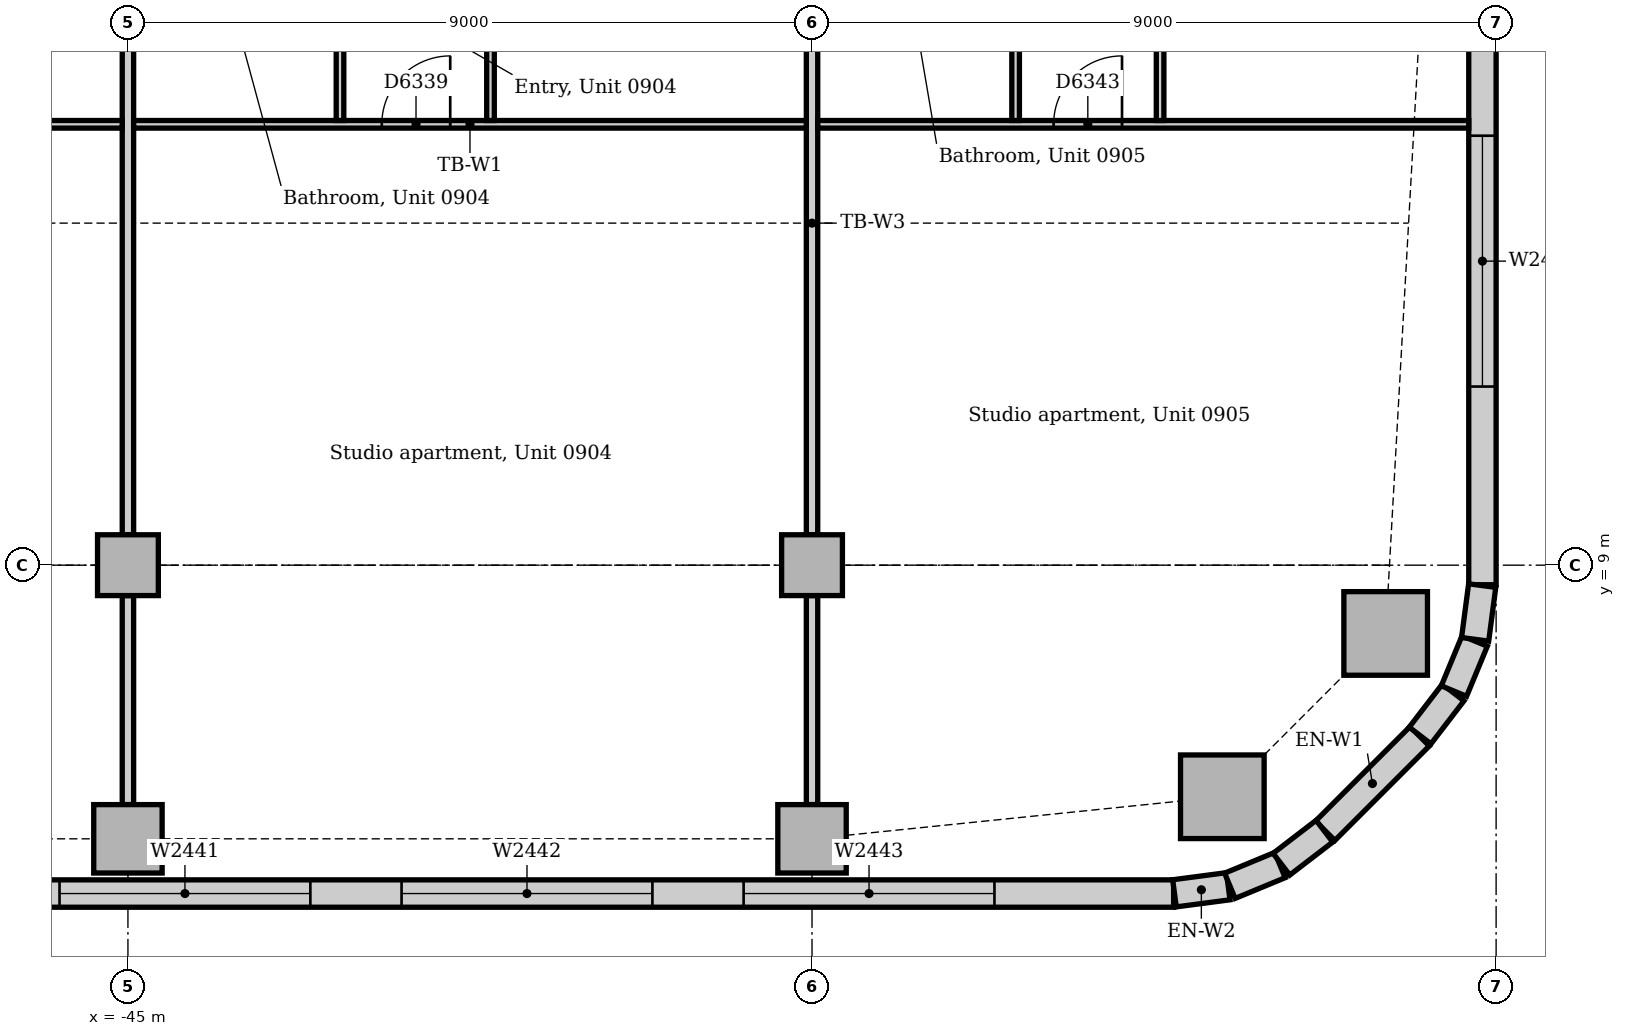
"""IFC4 building model, lengths in metres.
Left out: names, types, materials, properties, quantities, classifications, styles, units other than length and angle.
Written with IfcOpenShell. Run it as: python <this file> out.ifc"""

import sys

from ifc_helpers import new_model, si_unit, direction, frame, frame_2d, origin, origin_2d, place, context, subcontext, project, spatial, rectangle, extrude, element, fill, save


model = new_model("IFC4")
c1 = context("Model", 3, precision=1e-05, world=origin(), true_north=direction((0.0, 1.0)))
c2 = subcontext(c1, "Body", "Model", "MODEL_VIEW")
j1 = project(units=[si_unit("LENGTHUNIT", "METRE"), si_unit("PLANEANGLEUNIT", "RADIAN")], contexts=[c1])
p1 = place(None, origin())
s1 = spatial("IfcSite", under=j1, at=p1, CompositionType="ELEMENT")
p2 = place(p1, origin())
s2 = spatial("IfcBuilding", under=s1, at=p2, CompositionType="ELEMENT")
p3 = place(p2, frame((0.0, 0.0, 42.0)))
s3 = spatial("IfcBuildingStorey", under=s2, at=p3, CompositionType="ELEMENT", Elevation=42.0)
for number, where, z_axis, x_axis in (
    (1, (-30.602, 5.953, 0.0), (0.0, 0.0, 1.0), (1.0, 0.0, 0.0)),
    (2, (-28.453, 8.102, 0.0), (0.0, 0.0, 1.0), (1.0, 0.0, 0.0)),
):
    element("IfcColumn", number, at=place(p3, frame(where, z_axis=z_axis, x_axis=x_axis)), inside=s3, PredefinedType="COLUMN", context=c2, shape_type="SweptSolid", body=[
        extrude(rectangle(XDim=1.1, YDim=1.1, at=origin_2d()), origin(), (0.0, 0.0, 1.0), 3.7),
    ])
for number, where, z_axis, x_axis in (
    (3, (-45.0, 5.4, 0.0), (0.0, 0.0, 1.0), (1.0, 0.0, 0.0)),
    (4, (-36.0, 5.4, 0.0), (0.0, 0.0, 1.0), (1.0, 0.0, 0.0)),
):
    element("IfcColumn", number, at=place(p3, frame(where, z_axis=z_axis, x_axis=x_axis)), inside=s3, PredefinedType="COLUMN", context=c2, shape_type="SweptSolid", body=[
        extrude(rectangle(XDim=0.9, YDim=0.9, at=origin_2d()), origin(), (0.0, 0.0, 1.0), 3.7),
    ])
for number, where, z_axis, x_axis in (
    (5, (-45.0, 9.0, 0.0), (0.0, 0.0, 1.0), (1.0, 0.0, 0.0)),
    (6, (-36.0, 9.0, 0.0), (0.0, 0.0, 1.0), (1.0, 0.0, 0.0)),
):
    element("IfcColumn", number, at=place(p3, frame(where, z_axis=z_axis, x_axis=x_axis)), inside=s3, PredefinedType="COLUMN", context=c2, shape_type="SweptSolid", body=[
        extrude(rectangle(XDim=0.8, YDim=0.8, at=origin_2d()), origin(), (0.0, 0.0, 1.0), 3.7),
    ])
p4 = place(p3, frame((-61.757, 4.68, 0.0), z_axis=(0.0, 0.0, 1.0), x_axis=(1.0, 0.0, 0.0)))
e7 = element("IfcWall", 7, at=p4, inside=s3, PredefinedType="STANDARD", context=c2, shape_type="SweptSolid", body=[
    extrude(rectangle(XDim=30.515, YDim=0.36, at=frame_2d((15.257, 0.0))), origin(), (0.0, 0.0, 1.0), 3.7),
])
p5 = place(p4, frame((2.357, 0.0, 0.9)))
e8 = element("IfcOpeningElement", 8, at=p5, cuts=e7, PredefinedType="OPENING", context=c2, shape_type="SweptSolid", body=[
    extrude(rectangle(XDim=3.3, YDim=1.6, at=frame_2d((1.65, 0.8))), frame((0.0, 0.19, 0.0), z_axis=(0.0, -1.0, 0.0), x_axis=(1.0, 0.0, 0.0)), (0.0, 0.0, 1.0), 0.38),
])
p6 = place(p4, frame((6.857, 0.0, 0.9)))
e9 = element("IfcOpeningElement", 9, at=p6, cuts=e7, PredefinedType="OPENING", context=c2, shape_type="SweptSolid", body=[
    extrude(rectangle(XDim=3.3, YDim=1.6, at=frame_2d((1.65, 0.8))), frame((0.0, 0.19, 0.0), z_axis=(0.0, -1.0, 0.0), x_axis=(1.0, 0.0, 0.0)), (0.0, 0.0, 1.0), 0.38),
])
p7 = place(p4, frame((11.357, 0.0, 0.9)))
e10 = element("IfcOpeningElement", 10, at=p7, cuts=e7, PredefinedType="OPENING", context=c2, shape_type="SweptSolid", body=[
    extrude(rectangle(XDim=3.3, YDim=1.6, at=frame_2d((1.65, 0.8))), frame((0.0, 0.19, 0.0), z_axis=(0.0, -1.0, 0.0), x_axis=(1.0, 0.0, 0.0)), (0.0, 0.0, 1.0), 0.38),
])
p8 = place(p4, frame((15.857, 0.0, 0.9)))
e11 = element("IfcOpeningElement", 11, at=p8, cuts=e7, PredefinedType="OPENING", context=c2, shape_type="SweptSolid", body=[
    extrude(rectangle(XDim=3.3, YDim=1.6, at=frame_2d((1.65, 0.8))), frame((0.0, 0.19, 0.0), z_axis=(0.0, -1.0, 0.0), x_axis=(1.0, 0.0, 0.0)), (0.0, 0.0, 1.0), 0.38),
])
p9 = place(p4, frame((20.357, 0.0, 0.9)))
e12 = element("IfcOpeningElement", 12, at=p9, cuts=e7, PredefinedType="OPENING", context=c2, shape_type="SweptSolid", body=[
    extrude(rectangle(XDim=3.3, YDim=1.6, at=frame_2d((1.65, 0.8))), frame((0.0, 0.19, 0.0), z_axis=(0.0, -1.0, 0.0), x_axis=(1.0, 0.0, 0.0)), (0.0, 0.0, 1.0), 0.38),
])
p10 = place(p4, frame((24.857, 0.0, 0.9)))
e13 = element("IfcOpeningElement", 13, at=p10, cuts=e7, PredefinedType="OPENING", context=c2, shape_type="SweptSolid", body=[
    extrude(rectangle(XDim=3.3, YDim=1.6, at=frame_2d((1.65, 0.8))), frame((0.0, 0.19, 0.0), z_axis=(0.0, -1.0, 0.0), x_axis=(1.0, 0.0, 0.0)), (0.0, 0.0, 1.0), 0.38),
])
p11 = place(p3, frame((-29.249, 5.506, 0.0), z_axis=(0.0, 0.0, 1.0), x_axis=(0.707106781187, 0.707106781187, 0.0)))
e14 = element("IfcWall", 14, at=p11, inside=s3, PredefinedType="STANDARD", context=c2, shape_type="SweptSolid", body=[
    extrude(rectangle(XDim=1.757, YDim=0.36, at=frame_2d((0.879, 0.0))), origin(), (0.0, 0.0, 1.0), 3.7),
])
p12 = place(p3, frame((-27.18, 8.743, 0.0), z_axis=(0.0, 0.0, 1.0), x_axis=(0.0, 1.0, 0.0)))
e15 = element("IfcWall", 15, at=p12, inside=s3, PredefinedType="STANDARD", context=c2, shape_type="SweptSolid", body=[
    extrude(rectangle(XDim=12.257, YDim=0.36, at=frame_2d((6.129, 0.0))), origin(), (0.0, 0.0, 1.0), 3.7),
])
p13 = place(p12, frame((2.607, 0.0, 0.9)))
e16 = element("IfcOpeningElement", 16, at=p13, cuts=e15, PredefinedType="OPENING", context=c2, shape_type="SweptSolid", body=[
    extrude(rectangle(XDim=3.3, YDim=1.6, at=frame_2d((1.65, 0.8))), frame((0.0, 0.19, 0.0), z_axis=(0.0, -1.0, 0.0), x_axis=(1.0, 0.0, 0.0)), (0.0, 0.0, 1.0), 0.38),
])
p14 = place(p12, frame((7.607, 0.0, 0.9)))
e17 = element("IfcOpeningElement", 17, at=p14, cuts=e15, PredefinedType="OPENING", context=c2, shape_type="SweptSolid", body=[
    extrude(rectangle(XDim=3.3, YDim=1.6, at=frame_2d((1.65, 0.8))), frame((0.0, 0.19, 0.0), z_axis=(0.0, -1.0, 0.0), x_axis=(1.0, 0.0, 0.0)), (0.0, 0.0, 1.0), 0.38),
])
for number, where, z_axis, x_axis in (
    (18, (-31.231, 4.683, 0.0), (0.0, 0.0, 1.0), (0.991, 0.131, 0.0)),
    (19, (-30.503, 4.782, 0.0), (0.0, 0.0, 1.0), (0.924, 0.383, 0.0)),
):
    element("IfcWall", number, at=place(p3, frame(where, z_axis=z_axis, x_axis=x_axis)), inside=s3, PredefinedType="STANDARD", context=c2, shape_type="SweptSolid", body=[
        extrude(rectangle(XDim=0.713, YDim=0.36, at=frame_2d((0.356, 0.0))), origin(), (0.0, 0.0, 1.0), 3.7),
    ])
for number, where, z_axis, x_axis in (
    (20, (-29.825, 5.066, 0.0), (0.0, 0.0, 1.0), (0.793, 0.609, 0.0)),
    (21, (-28.0, 6.759, 0.0), (0.0, 0.0, 1.0), (0.609, 0.793, 0.0)),
):
    element("IfcWall", number, at=place(p3, frame(where, z_axis=z_axis, x_axis=x_axis)), inside=s3, PredefinedType="STANDARD", context=c2, shape_type="SweptSolid", body=[
        extrude(rectangle(XDim=0.713, YDim=0.36, at=frame_2d((0.357, 0.0))), origin(), (0.0, 0.0, 1.0), 3.7),
    ])
for number, where, z_axis, x_axis in (
    (22, (-27.555, 7.344, 0.0), (0.0, 0.0, 1.0), (0.383, 0.924, 0.0)),
    (23, (-27.276, 8.024, 0.0), (0.0, 0.0, 1.0), (0.131, 0.991, 0.0)),
):
    element("IfcWall", number, at=place(p3, frame(where, z_axis=z_axis, x_axis=x_axis)), inside=s3, PredefinedType="STANDARD", context=c2, shape_type="SweptSolid", body=[
        extrude(rectangle(XDim=0.713, YDim=0.36, at=frame_2d((0.356, 0.0))), origin(), (0.0, 0.0, 1.0), 3.7),
    ])
p15 = place(p3, frame((-45.0, 9.4, 0.0), z_axis=(0.0, 0.0, 1.0), x_axis=(0.0, 1.0, 0.0)))
e24 = element("IfcWall", 24, at=p15, inside=s3, PredefinedType="PARTITIONING", context=c2, shape_type="SweptSolid", body=[
    extrude(rectangle(XDim=8.2, YDim=0.15, at=frame_2d((4.1, 0.0))), origin(), (0.0, 0.0, 1.0), 3.008),
])
p16 = place(p3, frame((-45.0, 5.85, 0.0), z_axis=(0.0, 0.0, 1.0), x_axis=(0.0, 1.0, 0.0)))
e25 = element("IfcWall", 25, at=p16, inside=s3, PredefinedType="PARTITIONING", context=c2, shape_type="SweptSolid", body=[
    extrude(rectangle(XDim=2.75, YDim=0.15, at=frame_2d((1.375, 0.0))), origin(), (0.0, 0.0, 1.0), 3.502),
])
p17 = place(p3, frame((-36.0, 9.4, 0.0), z_axis=(0.0, 0.0, 1.0), x_axis=(0.0, 1.0, 0.0)))
e26 = element("IfcWall", 26, at=p17, inside=s3, PredefinedType="PARTITIONING", context=c2, shape_type="SweptSolid", body=[
    extrude(rectangle(XDim=8.2, YDim=0.15, at=frame_2d((4.1, 0.0))), origin(), (0.0, 0.0, 1.0), 3.008),
])
p18 = place(p3, frame((-36.0, 5.85, 0.0), z_axis=(0.0, 0.0, 1.0), x_axis=(0.0, 1.0, 0.0)))
e27 = element("IfcWall", 27, at=p18, inside=s3, PredefinedType="PARTITIONING", context=c2, shape_type="SweptSolid", body=[
    extrude(rectangle(XDim=2.75, YDim=0.15, at=frame_2d((1.375, 0.0))), origin(), (0.0, 0.0, 1.0), 3.502),
])
p19 = place(p3, frame((-53.925, 14.8, 0.0), z_axis=(0.0, 0.0, 1.0), x_axis=(1.0, 0.0, 0.0)))
e28 = element("IfcWall", 28, at=p19, inside=s3, PredefinedType="PARTITIONING", context=c2, shape_type="SweptSolid", body=[
    extrude(rectangle(XDim=8.85, YDim=0.1, at=frame_2d((4.425, 0.0))), origin(), (0.0, 0.0, 1.0), 3.7),
])
p20 = place(p19, frame((3.265, 0.0, 0.0)))
e29 = element("IfcOpeningElement", 29, at=p20, cuts=e28, PredefinedType="OPENING", context=c2, shape_type="SweptSolid", body=[
    extrude(rectangle(XDim=0.9, YDim=2.1, at=frame_2d((0.45, 1.05))), frame((0.0, 0.06, 0.0), z_axis=(0.0, -1.0, 0.0), x_axis=(1.0, 0.0, 0.0)), (0.0, 0.0, 1.0), 0.12),
])
p21 = place(p3, frame((-44.925, 14.8, 0.0), z_axis=(0.0, 0.0, 1.0), x_axis=(1.0, 0.0, 0.0)))
e30 = element("IfcWall", 30, at=p21, inside=s3, PredefinedType="PARTITIONING", context=c2, shape_type="SweptSolid", body=[
    extrude(rectangle(XDim=8.85, YDim=0.1, at=frame_2d((4.425, 0.0))), origin(), (0.0, 0.0, 1.0), 3.7),
])
p22 = place(p21, frame((3.265, 0.0, 0.0)))
e31 = element("IfcOpeningElement", 31, at=p22, cuts=e30, PredefinedType="OPENING", context=c2, shape_type="SweptSolid", body=[
    extrude(rectangle(XDim=0.9, YDim=2.1, at=frame_2d((0.45, 1.05))), frame((0.0, 0.06, 0.0), z_axis=(0.0, -1.0, 0.0), x_axis=(1.0, 0.0, 0.0)), (0.0, 0.0, 1.0), 0.12),
])
p23 = place(p3, frame((-35.925, 14.8, 0.0), z_axis=(0.0, 0.0, 1.0), x_axis=(1.0, 0.0, 0.0)))
e32 = element("IfcWall", 32, at=p23, inside=s3, PredefinedType="PARTITIONING", context=c2, shape_type="SweptSolid", body=[
    extrude(rectangle(XDim=8.565, YDim=0.1, at=frame_2d((4.282, 0.0))), origin(), (0.0, 0.0, 1.0), 3.7),
])
p24 = place(p23, frame((3.103, 0.0, 0.0)))
e33 = element("IfcOpeningElement", 33, at=p24, cuts=e32, PredefinedType="OPENING", context=c2, shape_type="SweptSolid", body=[
    extrude(rectangle(XDim=0.9, YDim=2.1, at=frame_2d((0.45, 1.05))), frame((0.0, 0.06, 0.0), z_axis=(0.0, -1.0, 0.0), x_axis=(1.0, 0.0, 0.0)), (0.0, 0.0, 1.0), 0.12),
])
p25 = place(p3, frame((-42.21, 14.85, 0.0), z_axis=(0.0, 0.0, 1.0), x_axis=(0.0, 1.0, 0.0)))
e34 = element("IfcWall", 34, at=p25, inside=s3, PredefinedType="PARTITIONING", context=c2, shape_type="SweptSolid", body=[
    extrude(rectangle(XDim=3.075, YDim=0.1, at=frame_2d((1.538, 0.0))), origin(), (0.0, 0.0, 1.0), 3.7),
])
p26 = place(p25, frame((1.1, 0.0, 0.0)))
e35 = element("IfcOpeningElement", 35, at=p26, cuts=e34, PredefinedType="OPENING", context=c2, shape_type="SweptSolid", body=[
    extrude(rectangle(XDim=0.9, YDim=2.1, at=frame_2d((0.45, 1.05))), frame((0.0, 0.06, 0.0), z_axis=(0.0, -1.0, 0.0), x_axis=(1.0, 0.0, 0.0)), (0.0, 0.0, 1.0), 0.12),
])
p27 = place(p3, frame((-40.23, 14.85, 0.0), z_axis=(0.0, 0.0, 1.0), x_axis=(0.0, 1.0, 0.0)))
e36 = element("IfcWall", 36, at=p27, inside=s3, PredefinedType="PARTITIONING", context=c2, shape_type="SweptSolid", body=[
    extrude(rectangle(XDim=3.075, YDim=0.1, at=frame_2d((1.538, 0.0))), origin(), (0.0, 0.0, 1.0), 3.7),
])
p28 = place(p27, frame((1.1, 0.0, 0.0)))
e37 = element("IfcOpeningElement", 37, at=p28, cuts=e36, PredefinedType="OPENING", context=c2, shape_type="SweptSolid", body=[
    extrude(rectangle(XDim=0.9, YDim=2.1, at=frame_2d((0.45, 1.05))), frame((0.0, 0.06, 0.0), z_axis=(0.0, -1.0, 0.0), x_axis=(1.0, 0.0, 0.0)), (0.0, 0.0, 1.0), 0.12),
])
p29 = place(p3, frame((-33.322, 14.85, 0.0), z_axis=(0.0, 0.0, 1.0), x_axis=(0.0, 1.0, 0.0)))
e38 = element("IfcWall", 38, at=p29, inside=s3, PredefinedType="PARTITIONING", context=c2, shape_type="SweptSolid", body=[
    extrude(rectangle(XDim=3.075, YDim=0.1, at=frame_2d((1.538, 0.0))), origin(), (0.0, 0.0, 1.0), 3.7),
])
p30 = place(p29, frame((1.1, 0.0, 0.0)))
e39 = element("IfcOpeningElement", 39, at=p30, cuts=e38, PredefinedType="OPENING", context=c2, shape_type="SweptSolid", body=[
    extrude(rectangle(XDim=0.9, YDim=2.1, at=frame_2d((0.45, 1.05))), frame((0.0, 0.06, 0.0), z_axis=(0.0, -1.0, 0.0), x_axis=(1.0, 0.0, 0.0)), (0.0, 0.0, 1.0), 0.12),
])
p31 = place(p3, frame((-31.421, 14.85, 0.0), z_axis=(0.0, 0.0, 1.0), x_axis=(0.0, 1.0, 0.0)))
e40 = element("IfcWall", 40, at=p31, inside=s3, PredefinedType="PARTITIONING", context=c2, shape_type="SweptSolid", body=[
    extrude(rectangle(XDim=3.075, YDim=0.1, at=frame_2d((1.538, 0.0))), origin(), (0.0, 0.0, 1.0), 3.7),
])
p32 = place(p31, frame((1.1, 0.0, 0.0)))
e41 = element("IfcOpeningElement", 41, at=p32, cuts=e40, PredefinedType="OPENING", context=c2, shape_type="SweptSolid", body=[
    extrude(rectangle(XDim=0.9, YDim=2.1, at=frame_2d((0.45, 1.05))), frame((0.0, 0.06, 0.0), z_axis=(0.0, -1.0, 0.0), x_axis=(1.0, 0.0, 0.0)), (0.0, 0.0, 1.0), 0.12),
])
p33 = place(p8, origin())
e42 = element("IfcWindow", 42, at=p33, inside=s3, PartitioningType="SINGLE_PANEL", PredefinedType="WINDOW", context=c2, shape_type="SweptSolid", body=[
    extrude(rectangle(XDim=3.3, YDim=1.6, at=frame_2d((1.65, 0.8))), frame((0.0, 0.13, 0.0), z_axis=(0.0, -1.0, 0.0), x_axis=(1.0, 0.0, 0.0)), (0.0, 0.0, 1.0), 0.06),
])
fill(e11, e42)
p34 = place(p9, origin())
e43 = element("IfcWindow", 43, at=p34, inside=s3, PartitioningType="SINGLE_PANEL", PredefinedType="WINDOW", context=c2, shape_type="SweptSolid", body=[
    extrude(rectangle(XDim=3.3, YDim=1.6, at=frame_2d((1.65, 0.8))), frame((0.0, 0.13, 0.0), z_axis=(0.0, -1.0, 0.0), x_axis=(1.0, 0.0, 0.0)), (0.0, 0.0, 1.0), 0.06),
])
fill(e12, e43)
p35 = place(p10, origin())
e44 = element("IfcWindow", 44, at=p35, inside=s3, PartitioningType="SINGLE_PANEL", PredefinedType="WINDOW", context=c2, shape_type="SweptSolid", body=[
    extrude(rectangle(XDim=3.3, YDim=1.6, at=frame_2d((1.65, 0.8))), frame((0.0, 0.13, 0.0), z_axis=(0.0, -1.0, 0.0), x_axis=(1.0, 0.0, 0.0)), (0.0, 0.0, 1.0), 0.06),
])
fill(e13, e44)
p36 = place(p13, origin())
e45 = element("IfcWindow", 45, at=p36, inside=s3, PartitioningType="SINGLE_PANEL", PredefinedType="WINDOW", context=c2, shape_type="SweptSolid", body=[
    extrude(rectangle(XDim=3.3, YDim=1.6, at=frame_2d((1.65, 0.8))), frame((0.0, 0.13, 0.0), z_axis=(0.0, -1.0, 0.0), x_axis=(1.0, 0.0, 0.0)), (0.0, 0.0, 1.0), 0.06),
])
fill(e16, e45)
p37 = place(p22, origin())
e46 = element("IfcDoor", 46, at=p37, inside=s3, OperationType="SINGLE_SWING_RIGHT", PredefinedType="DOOR", context=c2, shape_type="SweptSolid", body=[
    extrude(rectangle(XDim=0.9, YDim=2.1, at=frame_2d((0.45, 1.05))), frame((0.0, 0.025, 0.0), z_axis=(0.0, -1.0, 0.0), x_axis=(1.0, 0.0, 0.0)), (0.0, 0.0, 1.0), 0.05),
])
fill(e31, e46)
p38 = place(p24, origin())
e47 = element("IfcDoor", 47, at=p38, inside=s3, OperationType="SINGLE_SWING_RIGHT", PredefinedType="DOOR", context=c2, shape_type="SweptSolid", body=[
    extrude(rectangle(XDim=0.9, YDim=2.1, at=frame_2d((0.45, 1.05))), frame((0.0, 0.025, 0.0), z_axis=(0.0, -1.0, 0.0), x_axis=(1.0, 0.0, 0.0)), (0.0, 0.0, 1.0), 0.05),
])
fill(e33, e47)
save(model, sys.argv[1])
